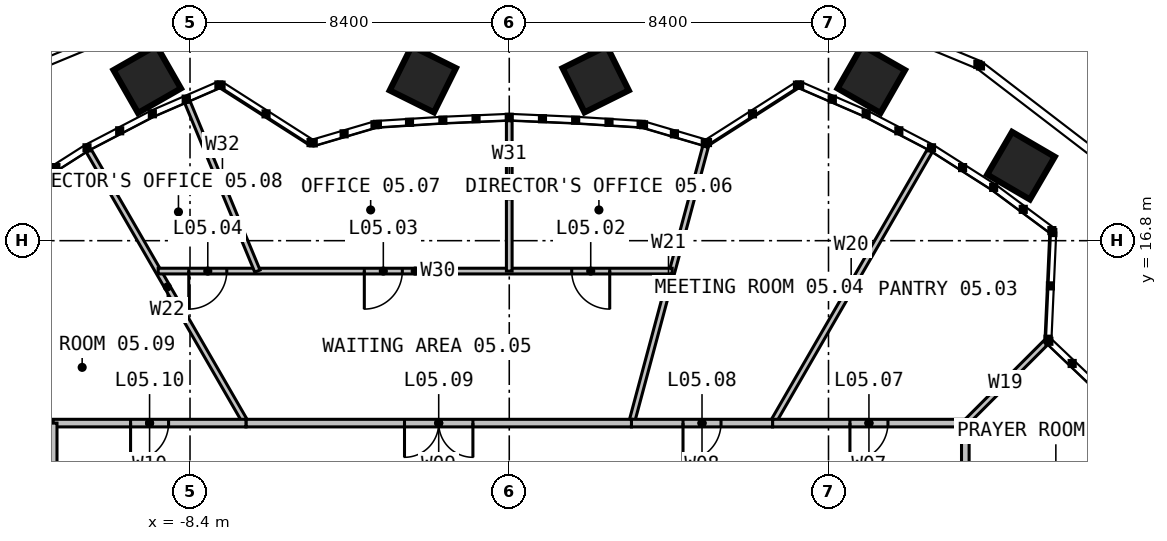
"""IFC4 building model, lengths in metres.
Left out: names, types, materials, properties, quantities, classifications, styles, units other than length and angle.
Written with IfcOpenShell. Run it as: python <this file> out.ifc"""

import sys

from ifc_helpers import new_model, si_unit, direction, frame, frame_2d, origin, place, context, subcontext, project, spatial, rectangle, extrude, element, fill, save


model = new_model("IFC4")
c1 = context("Model", 3, precision=1e-05, world=origin(), true_north=direction((0.0, 1.0)))
c2 = subcontext(c1, "Body", "Model", "MODEL_VIEW")
j1 = project(units=[si_unit("LENGTHUNIT", "METRE"), si_unit("PLANEANGLEUNIT", "RADIAN")], contexts=[c1])
p1 = place(None, origin())
s1 = spatial("IfcSite", under=j1, at=p1, CompositionType="ELEMENT")
p2 = place(p1, origin())
s2 = spatial("IfcBuilding", under=s1, at=p2, CompositionType="ELEMENT")
p3 = place(p2, frame((0.0, 0.0, 25.0)))
s3 = spatial("IfcBuildingStorey", under=s2, at=p3, CompositionType="ELEMENT", Elevation=25.0)
p4 = place(p3, frame((12.0, 12.0, 0.0), z_axis=(0.0, 0.0, 1.0), x_axis=(0.707106781187, 0.707106781187, 0.0)))
e1 = element("IfcWall", 1, at=p4, inside=s3, PredefinedType="PARTITIONING", context=c2, shape_type="SweptSolid", body=[
    extrude(rectangle(XDim=2.985, YDim=0.15, at=frame_2d((1.492, 0.0))), origin(), (0.0, 0.0, 1.0), 2.79),
])
p5 = place(p3, frame((6.928, 12.0, 0.0), z_axis=(0.0, 0.0, 1.0), x_axis=(0.499988970207, 0.866031771745, 0.0)))
e2 = element("IfcWall", 2, at=p5, inside=s3, PredefinedType="PARTITIONING", context=c2, shape_type="SweptSolid", body=[
    extrude(rectangle(XDim=8.273, YDim=0.15, at=frame_2d((4.137, 0.0))), origin(), (0.0, 0.0, 1.0), 2.79),
])
p6 = place(p3, frame((3.215, 12.0, 0.0), z_axis=(0.0, 0.0, 1.0), x_axis=(0.258814391452, 0.965927073219, 0.0)))
e3 = element("IfcWall", 3, at=p6, inside=s3, PredefinedType="PARTITIONING", context=c2, shape_type="SweptSolid", body=[
    extrude(rectangle(XDim=7.532, YDim=0.15, at=frame_2d((3.766, 0.0))), origin(), (0.0, 0.0, 1.0), 2.79),
])
p7 = place(p3, frame((-6.928, 12.0, 0.0), z_axis=(0.0, 0.0, 1.0), x_axis=(-0.499988970207, 0.866031771745, 0.0)))
e4 = element("IfcWall", 4, at=p7, inside=s3, PredefinedType="PARTITIONING", context=c2, shape_type="SweptSolid", body=[
    extrude(rectangle(XDim=8.273, YDim=0.15, at=frame_2d((4.137, 0.0))), origin(), (0.0, 0.0, 1.0), 2.79),
])
p8 = place(p3, frame((12.0, 6.928, 0.0), z_axis=(0.0, 0.0, 1.0), x_axis=(0.0, 1.0, 0.0)))
e5 = element("IfcWall", 5, at=p8, inside=s3, PredefinedType="PARTITIONING", context=c2, shape_type="SweptSolid", body=[
    extrude(rectangle(XDim=5.072, YDim=0.2, at=frame_2d((2.536, 0.0))), origin(), (0.0, 0.0, 1.0), 3.8),
])
p9 = place(p8, frame((2.036, 0.0, 0.0)))
e6 = element("IfcOpeningElement", 6, at=p9, cuts=e5, PredefinedType="OPENING", context=c2, shape_type="SweptSolid", body=[
    extrude(rectangle(XDim=1.0, YDim=2.2, at=frame_2d((0.5, 1.1))), frame((0.0, 0.11, 0.0), z_axis=(0.0, -1.0, 0.0), x_axis=(1.0, 0.0, 0.0)), (0.0, 0.0, 1.0), 0.22),
])
p10 = place(p3, frame((12.0, 12.0, 0.0), z_axis=(0.0, 0.0, 1.0), x_axis=(-1.0, 0.0, 0.0)))
e7 = element("IfcWall", 7, at=p10, inside=s3, PredefinedType="PARTITIONING", context=c2, shape_type="SweptSolid", body=[
    extrude(rectangle(XDim=5.072, YDim=0.2, at=frame_2d((2.536, 0.0))), origin(), (0.0, 0.0, 1.0), 3.8),
])
p11 = place(p10, frame((2.036, 0.0, 0.0)))
e8 = element("IfcOpeningElement", 8, at=p11, cuts=e7, PredefinedType="OPENING", context=c2, shape_type="SweptSolid", body=[
    extrude(rectangle(XDim=1.0, YDim=2.2, at=frame_2d((0.5, 1.1))), frame((0.0, 0.11, 0.0), z_axis=(0.0, -1.0, 0.0), x_axis=(1.0, 0.0, 0.0)), (0.0, 0.0, 1.0), 0.22),
])
p12 = place(p3, frame((6.928, 12.0, 0.0), z_axis=(0.0, 0.0, 1.0), x_axis=(-1.0, 0.0, 0.0)))
e9 = element("IfcWall", 9, at=p12, inside=s3, PredefinedType="PARTITIONING", context=c2, shape_type="SweptSolid", body=[
    extrude(rectangle(XDim=3.713, YDim=0.2, at=frame_2d((1.856, 0.0))), origin(), (0.0, 0.0, 1.0), 3.8),
])
p13 = place(p12, frame((1.356, 0.0, 0.0)))
e10 = element("IfcOpeningElement", 10, at=p13, cuts=e9, PredefinedType="OPENING", context=c2, shape_type="SweptSolid", body=[
    extrude(rectangle(XDim=1.0, YDim=2.2, at=frame_2d((0.5, 1.1))), frame((0.0, 0.11, 0.0), z_axis=(0.0, -1.0, 0.0), x_axis=(1.0, 0.0, 0.0)), (0.0, 0.0, 1.0), 0.22),
])
p14 = place(p3, frame((4.287, 16.0, 0.0), z_axis=(0.0, 0.0, 1.0), x_axis=(-1.0, 0.0, 0.0)))
e11 = element("IfcWall", 11, at=p14, inside=s3, PredefinedType="PARTITIONING", context=c2, shape_type="SweptSolid", body=[
    extrude(rectangle(XDim=13.525, YDim=0.15, at=frame_2d((6.762, 0.0))), origin(), (0.0, 0.0, 1.0), 2.79),
])
p15 = place(p14, frame((1.644, 0.0, 0.0)))
e12 = element("IfcOpeningElement", 12, at=p15, cuts=e11, PredefinedType="OPENING", context=c2, shape_type="SweptSolid", body=[
    extrude(rectangle(XDim=1.0, YDim=2.2, at=frame_2d((0.5, 1.1))), frame((0.0, 0.085, 0.0), z_axis=(0.0, -1.0, 0.0), x_axis=(1.0, 0.0, 0.0)), (0.0, 0.0, 1.0), 0.17),
])
p16 = place(p14, frame((7.101, 0.0, 0.0)))
e13 = element("IfcOpeningElement", 13, at=p16, cuts=e11, PredefinedType="OPENING", context=c2, shape_type="SweptSolid", body=[
    extrude(rectangle(XDim=1.0, YDim=2.2, at=frame_2d((0.5, 1.1))), frame((0.0, 0.085, 0.0), z_axis=(0.0, -1.0, 0.0), x_axis=(1.0, 0.0, 0.0)), (0.0, 0.0, 1.0), 0.17),
])
p17 = place(p14, frame((11.72, 0.0, 0.0)))
e14 = element("IfcOpeningElement", 14, at=p17, cuts=e11, PredefinedType="OPENING", context=c2, shape_type="SweptSolid", body=[
    extrude(rectangle(XDim=1.0, YDim=2.2, at=frame_2d((0.5, 1.1))), frame((0.0, 0.085, 0.0), z_axis=(0.0, -1.0, 0.0), x_axis=(1.0, 0.0, 0.0)), (0.0, 0.0, 1.0), 0.17),
])
p18 = place(p3, frame((0.0, 16.0, 0.0), z_axis=(0.0, 0.0, 1.0), x_axis=(0.0, 1.0, 0.0)))
e15 = element("IfcWall", 15, at=p18, inside=s3, PredefinedType="PARTITIONING", context=c2, shape_type="SweptSolid", body=[
    extrude(rectangle(XDim=3.956, YDim=0.15, at=frame_2d((1.978, 0.0))), origin(), (0.0, 0.0, 1.0), 2.79),
])
p19 = place(p3, frame((-6.627, 16.0, 0.0), z_axis=(0.0, 0.0, 1.0), x_axis=(-0.382688295595, 0.92387751808, 0.0)))
e16 = element("IfcWall", 16, at=p19, inside=s3, PredefinedType="PARTITIONING", context=c2, shape_type="SweptSolid", body=[
    extrude(rectangle(XDim=4.806, YDim=0.15, at=frame_2d((2.403, 0.0))), origin(), (0.0, 0.0, 1.0), 2.79),
])
p20 = place(p3, frame((3.215, 12.0, 0.0), z_axis=(0.0, 0.0, 1.0), x_axis=(-1.0, 0.0, 0.0)))
e17 = element("IfcWall", 17, at=p20, inside=s3, PredefinedType="PARTITIONING", context=c2, shape_type="SweptSolid", body=[
    extrude(rectangle(XDim=10.144, YDim=0.2, at=frame_2d((5.072, 0.0))), origin(), (0.0, 0.0, 1.0), 3.8),
])
p21 = place(p20, frame((4.172, 0.0, 0.0)))
e18 = element("IfcOpeningElement", 18, at=p21, cuts=e17, PredefinedType="OPENING", context=c2, shape_type="SweptSolid", body=[
    extrude(rectangle(XDim=1.8, YDim=2.2, at=frame_2d((0.9, 1.1))), frame((0.0, 0.11, 0.0), z_axis=(0.0, -1.0, 0.0), x_axis=(1.0, 0.0, 0.0)), (0.0, 0.0, 1.0), 0.22),
])
p22 = place(p3, frame((-6.928, 12.0, 0.0), z_axis=(0.0, 0.0, 1.0), x_axis=(-1.0, 0.0, 0.0)))
e19 = element("IfcWall", 19, at=p22, inside=s3, PredefinedType="PARTITIONING", context=c2, shape_type="SweptSolid", body=[
    extrude(rectangle(XDim=5.072, YDim=0.2, at=frame_2d((2.536, 0.0))), origin(), (0.0, 0.0, 1.0), 3.8),
])
p23 = place(p22, frame((2.036, 0.0, 0.0)))
e20 = element("IfcOpeningElement", 20, at=p23, cuts=e19, PredefinedType="OPENING", context=c2, shape_type="SweptSolid", body=[
    extrude(rectangle(XDim=1.0, YDim=2.2, at=frame_2d((0.5, 1.1))), frame((0.0, 0.11, 0.0), z_axis=(0.0, -1.0, 0.0), x_axis=(1.0, 0.0, 0.0)), (0.0, 0.0, 1.0), 0.22),
])
p24 = place(p3, frame((-12.0, 12.0, 0.0), z_axis=(0.0, 0.0, 1.0), x_axis=(0.0, -1.0, 0.0)))
e21 = element("IfcWall", 21, at=p24, inside=s3, PredefinedType="PARTITIONING", context=c2, shape_type="SweptSolid", body=[
    extrude(rectangle(XDim=5.072, YDim=0.2, at=frame_2d((2.536, 0.0))), origin(), (0.0, 0.0, 1.0), 3.8),
])
p25 = place(p11, origin())
e22 = element("IfcDoor", 22, at=p25, inside=s3, OperationType="SINGLE_SWING_RIGHT", PredefinedType="DOOR", context=c2, shape_type="SweptSolid", body=[
    extrude(rectangle(XDim=1.0, YDim=2.2, at=frame_2d((0.5, 1.1))), frame((0.0, 0.025, 0.0), z_axis=(0.0, -1.0, 0.0), x_axis=(1.0, 0.0, 0.0)), (0.0, 0.0, 1.0), 0.05),
])
fill(e8, e22)
p26 = place(p13, origin())
e23 = element("IfcDoor", 23, at=p26, inside=s3, OperationType="SINGLE_SWING_RIGHT", PredefinedType="DOOR", context=c2, shape_type="SweptSolid", body=[
    extrude(rectangle(XDim=1.0, YDim=2.2, at=frame_2d((0.5, 1.1))), frame((0.0, 0.025, 0.0), z_axis=(0.0, -1.0, 0.0), x_axis=(1.0, 0.0, 0.0)), (0.0, 0.0, 1.0), 0.05),
])
fill(e10, e23)
p27 = place(p15, origin())
e24 = element("IfcDoor", 24, at=p27, inside=s3, OperationType="SINGLE_SWING_LEFT", PredefinedType="DOOR", context=c2, shape_type="SweptSolid", body=[
    extrude(rectangle(XDim=1.0, YDim=2.2, at=frame_2d((0.5, 1.1))), frame((0.0, 0.025, 0.0), z_axis=(0.0, -1.0, 0.0), x_axis=(1.0, 0.0, 0.0)), (0.0, 0.0, 1.0), 0.05),
])
fill(e12, e24)
p28 = place(p16, origin())
e25 = element("IfcDoor", 25, at=p28, inside=s3, OperationType="SINGLE_SWING_RIGHT", PredefinedType="DOOR", context=c2, shape_type="SweptSolid", body=[
    extrude(rectangle(XDim=1.0, YDim=2.2, at=frame_2d((0.5, 1.1))), frame((0.0, 0.025, 0.0), z_axis=(0.0, -1.0, 0.0), x_axis=(1.0, 0.0, 0.0)), (0.0, 0.0, 1.0), 0.05),
])
fill(e13, e25)
p29 = place(p17, origin())
e26 = element("IfcDoor", 26, at=p29, inside=s3, OperationType="SINGLE_SWING_RIGHT", PredefinedType="DOOR", context=c2, shape_type="SweptSolid", body=[
    extrude(rectangle(XDim=1.0, YDim=2.2, at=frame_2d((0.5, 1.1))), frame((0.0, 0.025, 0.0), z_axis=(0.0, -1.0, 0.0), x_axis=(1.0, 0.0, 0.0)), (0.0, 0.0, 1.0), 0.05),
])
fill(e14, e26)
p30 = place(p21, origin())
e27 = element("IfcDoor", 27, at=p30, inside=s3, OperationType="DOUBLE_DOOR_SINGLE_SWING", PredefinedType="DOOR", context=c2, shape_type="SweptSolid", body=[
    extrude(rectangle(XDim=1.8, YDim=2.2, at=frame_2d((0.9, 1.1))), frame((0.0, 0.025, 0.0), z_axis=(0.0, -1.0, 0.0), x_axis=(1.0, 0.0, 0.0)), (0.0, 0.0, 1.0), 0.05),
])
fill(e18, e27)
p31 = place(p23, origin())
e28 = element("IfcDoor", 28, at=p31, inside=s3, OperationType="SINGLE_SWING_RIGHT", PredefinedType="DOOR", context=c2, shape_type="SweptSolid", body=[
    extrude(rectangle(XDim=1.0, YDim=2.2, at=frame_2d((0.5, 1.1))), frame((0.0, 0.025, 0.0), z_axis=(0.0, -1.0, 0.0), x_axis=(1.0, 0.0, 0.0)), (0.0, 0.0, 1.0), 0.05),
])
fill(e20, e28)
save(model, sys.argv[1])
